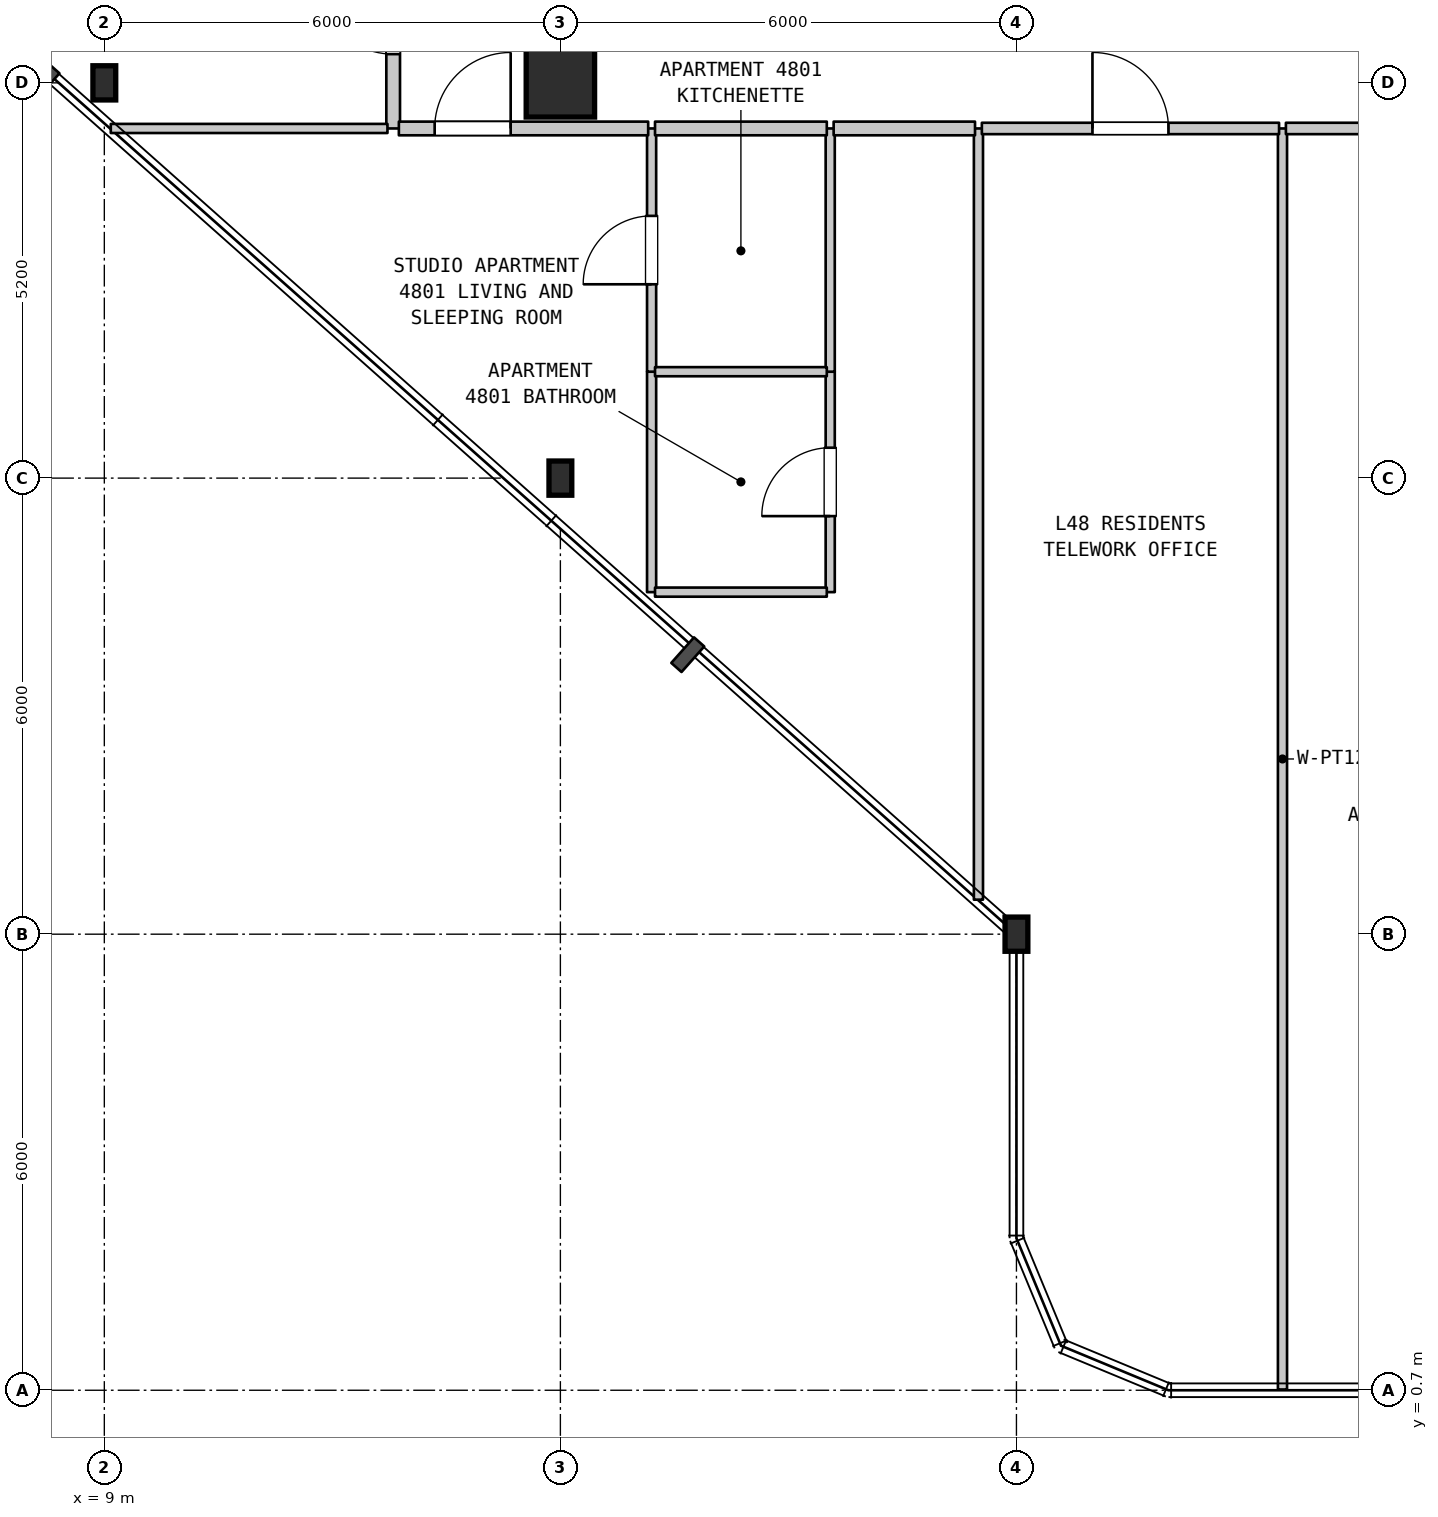
"""IFC4 building model, lengths in metres.
Left out: names, types, materials, properties, quantities, classifications, styles, units other than length and angle.
Written with IfcOpenShell. Run it as: python <this file> out.ifc"""

import sys

from ifc_helpers import new_model, si_unit, direction, frame, frame_2d, origin, origin_2d, place, context, subcontext, project, spatial, rectangle, i_section, extrude, element, fill, save


model = new_model("IFC4")
c1 = context("Model", 3, precision=1e-05, world=origin(), true_north=direction((0.0, 1.0)))
c2 = subcontext(c1, "Body", "Model", "MODEL_VIEW")
j1 = project(units=[si_unit("LENGTHUNIT", "METRE"), si_unit("PLANEANGLEUNIT", "RADIAN")], contexts=[c1])
p1 = place(None, origin())
s1 = spatial("IfcSite", under=j1, at=p1, CompositionType="ELEMENT")
p2 = place(p1, origin())
s2 = spatial("IfcBuilding", under=s1, at=p2, CompositionType="ELEMENT")
p3 = place(p2, frame((0.0, 0.0, 195.8)))
s3 = spatial("IfcBuildingStorey", under=s2, at=p3, CompositionType="ELEMENT", Elevation=195.8)
for number, where, z_axis, x_axis in (
    (1, (9.0, 17.9, 0.0), (0.0, 0.0, 1.0), (1.0, 0.0, 0.0)),
    (2, (15.0, 12.7, 0.0), (0.0, 0.0, 1.0), (1.0, 0.0, 0.0)),
):
    element("IfcColumn", number, at=place(p3, frame(where, z_axis=z_axis, x_axis=x_axis)), inside=s3, PredefinedType="COLUMN", context=c2, shape_type="SweptSolid", body=[
        extrude(i_section(OverallWidth=0.3, OverallDepth=0.45, WebThickness=0.014, FlangeThickness=0.026, FilletRadius=0.027, at=origin_2d()), origin(), (0.0, 0.0, 1.0), 3.7),
    ])
p4 = place(p3, frame((15.0, 17.9, 0.0), z_axis=(0.0, 0.0, 1.0), x_axis=(1.0, 0.0, 0.0)))
e3 = element("IfcColumn", 3, at=p4, inside=s3, PredefinedType="COLUMN", context=c2, shape_type="SweptSolid", body=[
    extrude(rectangle(XDim=0.9, YDim=0.9, at=origin_2d()), origin(), (0.0, 0.0, 1.0), 3.7),
])
p5 = place(p3, frame((21.0, 6.7, 0.0), z_axis=(0.0, 0.0, 1.0), x_axis=(1.0, 0.0, 0.0)))
e4 = element("IfcColumn", 4, at=p5, inside=s3, PredefinedType="COLUMN", context=c2, shape_type="SweptSolid", body=[
    extrude(i_section(OverallWidth=0.3, OverallDepth=0.45, WebThickness=0.014, FlangeThickness=0.026, FilletRadius=0.027, at=origin_2d()), origin(), (0.0, 0.0, 1.0), 3.7),
])
p6 = place(p3, frame((12.8, 17.3, 0.0), z_axis=(0.0, 0.0, 1.0), x_axis=(0.0, 1.0, 0.0)))
e5 = element("IfcWall", 5, at=p6, inside=s3, PredefinedType="STANDARD", context=c2, shape_type="SweptSolid", body=[
    extrude(rectangle(XDim=3.1, YDim=0.18, at=frame_2d((1.55, 0.0))), origin(), (0.0, 0.0, 1.0), 3.39),
])
p7 = place(p6, frame((0.978, 0.0, 0.0)))
e6 = element("IfcOpeningElement", 6, at=p7, cuts=e5, PredefinedType="OPENING", context=c2, shape_type="SweptSolid", body=[
    extrude(rectangle(XDim=1.0, YDim=2.15, at=frame_2d((0.5, 1.075))), frame((0.0, 0.1, 0.0), z_axis=(0.0, -1.0, 0.0), x_axis=(1.0, 0.0, 0.0)), (0.0, 0.0, 1.0), 0.2),
])
p8 = place(p3, frame((16.2, 11.2, 0.0), z_axis=(0.0, 0.0, 1.0), x_axis=(0.0, 1.0, 0.0)))
e7 = element("IfcWall", 7, at=p8, inside=s3, PredefinedType="PARTITIONING", context=c2, shape_type="SweptSolid", body=[
    extrude(rectangle(XDim=2.9, YDim=0.12, at=frame_2d((1.45, 0.0))), origin(), (0.0, 0.0, 1.0), 3.39),
])
p9 = place(p3, frame((16.2, 14.1, 0.0), z_axis=(0.0, 0.0, 1.0), x_axis=(0.0, 1.0, 0.0)))
e8 = element("IfcWall", 8, at=p9, inside=s3, PredefinedType="PARTITIONING", context=c2, shape_type="SweptSolid", body=[
    extrude(rectangle(XDim=3.2, YDim=0.12, at=frame_2d((1.6, 0.0))), origin(), (0.0, 0.0, 1.0), 3.39),
])
p10 = place(p9, frame((1.15, 0.0, 0.0)))
e9 = element("IfcOpeningElement", 9, at=p10, cuts=e8, PredefinedType="OPENING", context=c2, shape_type="SweptSolid", body=[
    extrude(rectangle(XDim=0.9, YDim=2.15, at=frame_2d((0.45, 1.075))), frame((0.0, 0.07, 0.0), z_axis=(0.0, -1.0, 0.0), x_axis=(1.0, 0.0, 0.0)), (0.0, 0.0, 1.0), 0.14),
])
p11 = place(p3, frame((18.55, 11.2, 0.0), z_axis=(0.0, 0.0, 1.0), x_axis=(0.0, 1.0, 0.0)))
e10 = element("IfcWall", 10, at=p11, inside=s3, PredefinedType="PARTITIONING", context=c2, shape_type="SweptSolid", body=[
    extrude(rectangle(XDim=2.9, YDim=0.12, at=frame_2d((1.45, 0.0))), origin(), (0.0, 0.0, 1.0), 3.39),
])
p12 = place(p11, frame((1.0, 0.0, 0.0)))
e11 = element("IfcOpeningElement", 11, at=p12, cuts=e10, PredefinedType="OPENING", context=c2, shape_type="SweptSolid", body=[
    extrude(rectangle(XDim=0.9, YDim=2.1, at=frame_2d((0.45, 1.05))), frame((0.0, 0.07, 0.0), z_axis=(0.0, -1.0, 0.0), x_axis=(1.0, 0.0, 0.0)), (0.0, 0.0, 1.0), 0.14),
])
p13 = place(p3, frame((18.55, 14.1, 0.0), z_axis=(0.0, 0.0, 1.0), x_axis=(0.0, 1.0, 0.0)))
e12 = element("IfcWall", 12, at=p13, inside=s3, PredefinedType="PARTITIONING", context=c2, shape_type="SweptSolid", body=[
    extrude(rectangle(XDim=3.2, YDim=0.12, at=frame_2d((1.6, 0.0))), origin(), (0.0, 0.0, 1.0), 3.39),
])
p14 = place(p3, frame((20.5, 7.154, 0.0), z_axis=(0.0, 0.0, 1.0), x_axis=(0.0, 1.0, 0.0)))
e13 = element("IfcWall", 13, at=p14, inside=s3, PredefinedType="PARTITIONING", context=c2, shape_type="SweptSolid", body=[
    extrude(rectangle(XDim=10.146, YDim=0.12, at=frame_2d((5.073, 0.0))), origin(), (0.0, 0.0, 1.0), 3.39),
])
p15 = place(p3, frame((24.5, 0.71, 0.0), z_axis=(0.0, 0.0, 1.0), x_axis=(0.0, 1.0, 0.0)))
e14 = element("IfcWall", 14, at=p15, inside=s3, PredefinedType="PARTITIONING", context=c2, shape_type="SweptSolid", body=[
    extrude(rectangle(XDim=16.59, YDim=0.12, at=frame_2d((8.295, 0.0))), origin(), (0.0, 0.0, 1.0), 3.39),
])
for number, where, z_axis, x_axis in (
    (15, (16.245, 11.2, 0.0), (0.0, 0.0, 1.0), (1.0, 0.0, 0.0)),
    (16, (16.245, 14.1, 0.0), (0.0, 0.0, 1.0), (1.0, 0.0, 0.0)),
):
    element("IfcWall", number, at=place(p3, frame(where, z_axis=z_axis, x_axis=x_axis)), inside=s3, PredefinedType="PARTITIONING", context=c2, shape_type="SweptSolid", body=[
        extrude(rectangle(XDim=2.26, YDim=0.12, at=frame_2d((1.13, 0.0))), origin(), (0.0, 0.0, 1.0), 3.39),
    ])
p16 = place(p3, frame((9.085, 17.3, 0.0), z_axis=(0.0, 0.0, 1.0), x_axis=(1.0, 0.0, 0.0)))
e17 = element("IfcWall", 17, at=p16, inside=s3, PredefinedType="PARTITIONING", context=c2, shape_type="SweptSolid", body=[
    extrude(rectangle(XDim=3.64, YDim=0.12, at=frame_2d((1.82, 0.0))), origin(), (0.0, 0.0, 1.0), 3.39),
])
p17 = place(p3, frame((12.875, 17.3, 0.0), z_axis=(0.0, 0.0, 1.0), x_axis=(1.0, 0.0, 0.0)))
e18 = element("IfcWall", 18, at=p17, inside=s3, PredefinedType="STANDARD", context=c2, shape_type="SweptSolid", body=[
    extrude(rectangle(XDim=3.28, YDim=0.18, at=frame_2d((1.64, 0.0))), origin(), (0.0, 0.0, 1.0), 3.39),
])
p18 = place(p17, frame((0.471, 0.0, 0.0)))
e19 = element("IfcOpeningElement", 19, at=p18, cuts=e18, PredefinedType="OPENING", context=c2, shape_type="SweptSolid", body=[
    extrude(rectangle(XDim=1.0, YDim=2.15, at=frame_2d((0.5, 1.075))), frame((0.0, 0.1, 0.0), z_axis=(0.0, -1.0, 0.0), x_axis=(1.0, 0.0, 0.0)), (0.0, 0.0, 1.0), 0.2),
])
p19 = place(p3, frame((16.245, 17.3, 0.0), z_axis=(0.0, 0.0, 1.0), x_axis=(1.0, 0.0, 0.0)))
e20 = element("IfcWall", 20, at=p19, inside=s3, PredefinedType="STANDARD", context=c2, shape_type="SweptSolid", body=[
    extrude(rectangle(XDim=2.26, YDim=0.18, at=frame_2d((1.13, 0.0))), origin(), (0.0, 0.0, 1.0), 3.39),
])
p20 = place(p3, frame((18.595, 17.3, 0.0), z_axis=(0.0, 0.0, 1.0), x_axis=(1.0, 0.0, 0.0)))
e21 = element("IfcWall", 21, at=p20, inside=s3, PredefinedType="STANDARD", context=c2, shape_type="SweptSolid", body=[
    extrude(rectangle(XDim=1.86, YDim=0.18, at=frame_2d((0.93, 0.0))), origin(), (0.0, 0.0, 1.0), 3.39),
])
p21 = place(p3, frame((20.545, 17.3, 0.0), z_axis=(0.0, 0.0, 1.0), x_axis=(1.0, 0.0, 0.0)))
e22 = element("IfcWall", 22, at=p21, inside=s3, PredefinedType="STANDARD", context=c2, shape_type="SweptSolid", body=[
    extrude(rectangle(XDim=3.91, YDim=0.15, at=frame_2d((1.955, 0.0))), origin(), (0.0, 0.0, 1.0), 3.39),
])
p22 = place(p21, frame((1.455, 0.0, 0.0)))
e23 = element("IfcOpeningElement", 23, at=p22, cuts=e22, PredefinedType="OPENING", context=c2, shape_type="SweptSolid", body=[
    extrude(rectangle(XDim=1.0, YDim=2.15, at=frame_2d((0.5, 1.075))), frame((0.0, 0.085, 0.0), z_axis=(0.0, -1.0, 0.0), x_axis=(1.0, 0.0, 0.0)), (0.0, 0.0, 1.0), 0.17),
])
p23 = place(p3, frame((24.545, 17.3, 0.0), z_axis=(0.0, 0.0, 1.0), x_axis=(1.0, 0.0, 0.0)))
e24 = element("IfcWall", 24, at=p23, inside=s3, PredefinedType="STANDARD", context=c2, shape_type="SweptSolid", body=[
    extrude(rectangle(XDim=4.21, YDim=0.15, at=frame_2d((2.105, 0.0))), origin(), (0.0, 0.0, 1.0), 3.39),
])
p24 = place(p23, frame((1.605, 0.0, 0.0)))
e25 = element("IfcOpeningElement", 25, at=p24, cuts=e24, PredefinedType="OPENING", context=c2, shape_type="SweptSolid", body=[
    extrude(rectangle(XDim=1.0, YDim=2.15, at=frame_2d((0.5, 1.075))), frame((0.0, 0.085, 0.0), z_axis=(0.0, -1.0, 0.0), x_axis=(1.0, 0.0, 0.0)), (0.0, 0.0, 1.0), 0.17),
])
p25 = place(p7, origin())
e26 = element("IfcDoor", 26, at=p25, inside=s3, OperationType="SINGLE_SWING_RIGHT", PredefinedType="DOOR", context=c2, shape_type="SweptSolid", body=[
    extrude(rectangle(XDim=1.0, YDim=2.15, at=frame_2d((0.5, 1.075))), frame((0.0, 0.025, 0.0), z_axis=(0.0, -1.0, 0.0), x_axis=(1.0, 0.0, 0.0)), (0.0, 0.0, 1.0), 0.05),
])
fill(e6, e26)
p26 = place(p10, origin())
e27 = element("IfcDoor", 27, at=p26, inside=s3, OperationType="SINGLE_SWING_LEFT", PredefinedType="DOOR", context=c2, shape_type="SweptSolid", body=[
    extrude(rectangle(XDim=0.9, YDim=2.15, at=frame_2d((0.45, 1.075))), frame((0.0, 0.025, 0.0), z_axis=(0.0, -1.0, 0.0), x_axis=(1.0, 0.0, 0.0)), (0.0, 0.0, 1.0), 0.05),
])
fill(e9, e27)
p27 = place(p12, origin())
e28 = element("IfcDoor", 28, at=p27, inside=s3, OperationType="SINGLE_SWING_LEFT", PredefinedType="DOOR", context=c2, shape_type="SweptSolid", body=[
    extrude(rectangle(XDim=0.9, YDim=2.1, at=frame_2d((0.45, 1.05))), frame((0.0, 0.025, 0.0), z_axis=(0.0, -1.0, 0.0), x_axis=(1.0, 0.0, 0.0)), (0.0, 0.0, 1.0), 0.05),
])
fill(e11, e28)
p28 = place(p18, origin())
e29 = element("IfcDoor", 29, at=p28, inside=s3, OperationType="SINGLE_SWING_RIGHT", PredefinedType="DOOR", context=c2, shape_type="SweptSolid", body=[
    extrude(rectangle(XDim=1.0, YDim=2.15, at=frame_2d((0.5, 1.075))), frame((0.0, 0.025, 0.0), z_axis=(0.0, -1.0, 0.0), x_axis=(1.0, 0.0, 0.0)), (0.0, 0.0, 1.0), 0.05),
])
fill(e19, e29)
p29 = place(p22, origin())
e30 = element("IfcDoor", 30, at=p29, inside=s3, OperationType="SINGLE_SWING_LEFT", PredefinedType="DOOR", context=c2, shape_type="SweptSolid", body=[
    extrude(rectangle(XDim=1.0, YDim=2.15, at=frame_2d((0.5, 1.075))), frame((0.0, 0.025, 0.0), z_axis=(0.0, -1.0, 0.0), x_axis=(1.0, 0.0, 0.0)), (0.0, 0.0, 1.0), 0.05),
])
fill(e23, e30)
save(model, sys.argv[1])
